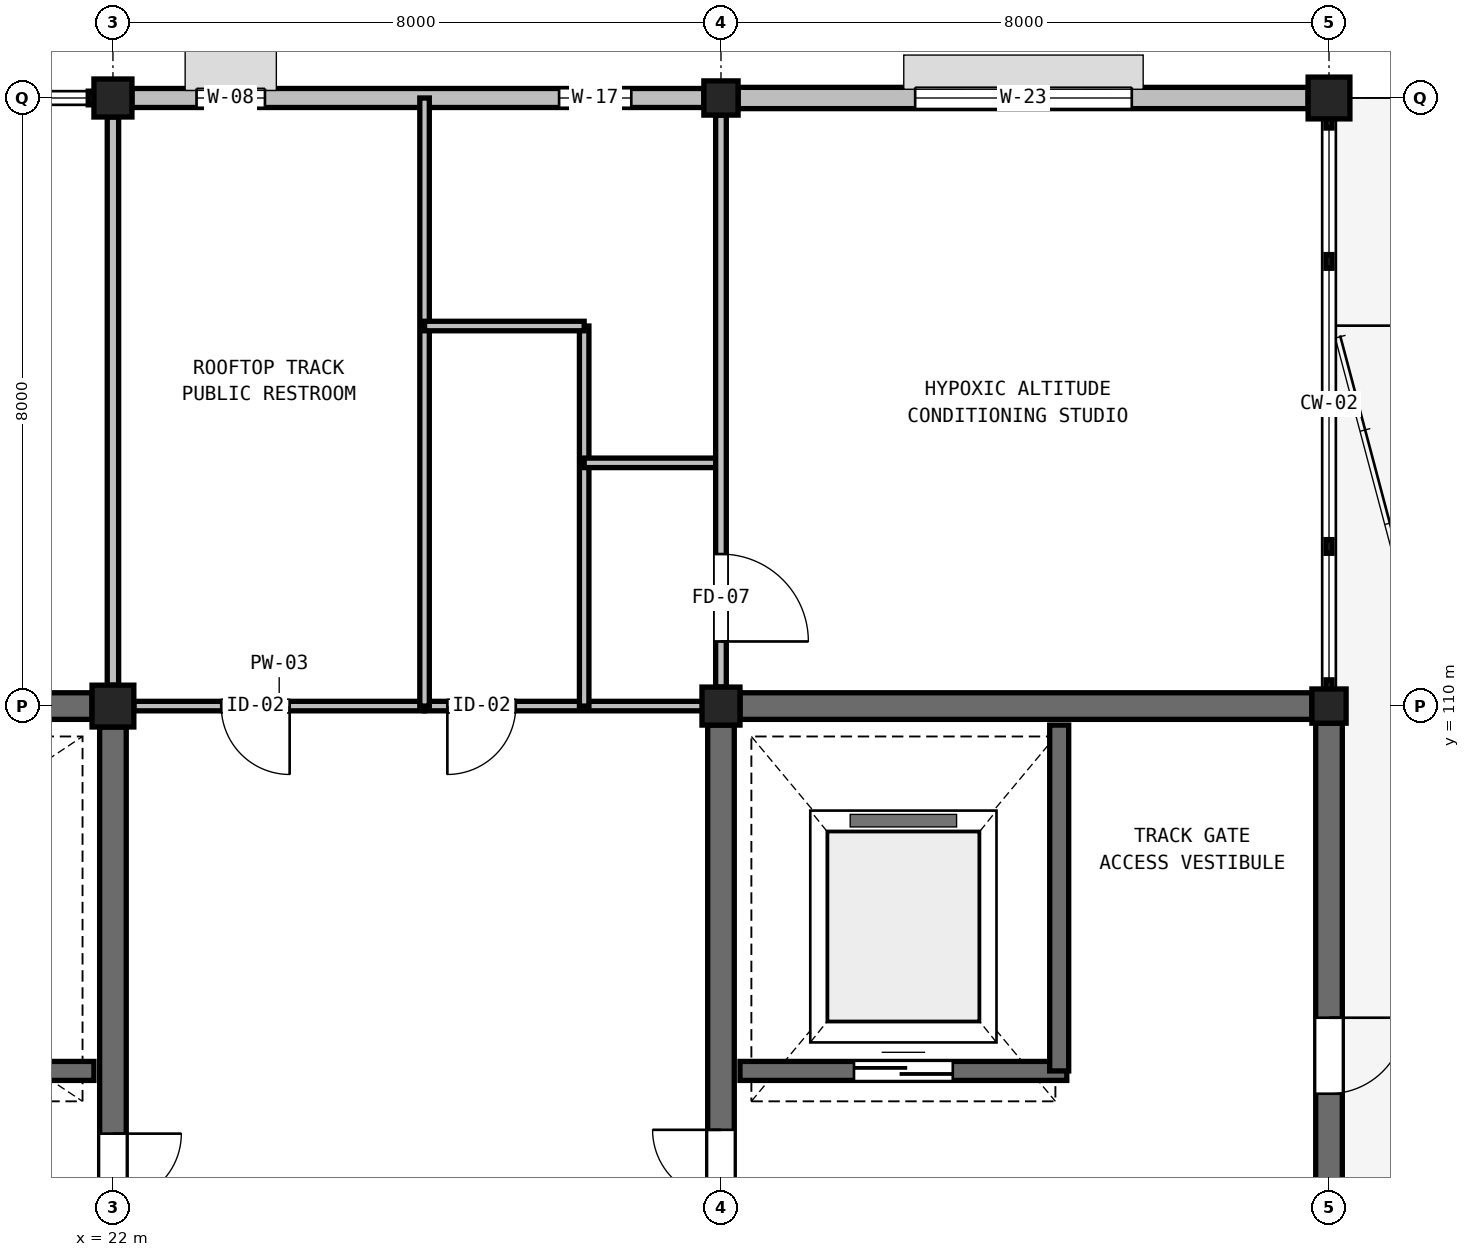
"""IFC4 building model, lengths in metres.
Left out: names, types, materials, properties, quantities, classifications, styles, units other than length and angle.
Written with IfcOpenShell. Run it as: python <this file> out.ifc"""

import sys

from ifc_helpers import new_model, si_unit, direction, frame, frame_2d, origin, origin_2d, place, context, subcontext, project, spatial, rectangle, extrude, element, fill, save


model = new_model("IFC4")
c1 = context("Model", 3, precision=1e-05, world=origin(), true_north=direction((0.0, 1.0)))
c2 = subcontext(c1, "Body", "Model", "MODEL_VIEW")
j1 = project(units=[si_unit("LENGTHUNIT", "METRE"), si_unit("PLANEANGLEUNIT", "RADIAN")], contexts=[c1])
p1 = place(None, origin())
s1 = spatial("IfcSite", under=j1, at=p1, CompositionType="ELEMENT")
p2 = place(p1, origin())
s2 = spatial("IfcBuilding", under=s1, at=p2, CompositionType="ELEMENT")
p3 = place(p2, frame((0.0, 0.0, 19.2)))
s3 = spatial("IfcBuildingStorey", under=s2, at=p3, CompositionType="ELEMENT", Elevation=19.2)
p4 = place(p3, frame((22.0, 110.0, 0.0), z_axis=(0.0, 0.0, 1.0), x_axis=(1.0, 0.0, 0.0)))
e1 = element("IfcColumn", 1, at=p4, inside=s3, PredefinedType="COLUMN", context=c2, shape_type="SweptSolid", body=[
    extrude(rectangle(XDim=0.55, YDim=0.55, at=origin_2d()), origin(), (0.0, 0.0, 1.0), 4.2),
])
for number, where, z_axis, x_axis in (
    (2, (22.0, 118.0, 0.0), (0.0, 0.0, 1.0), (1.0, 0.0, 0.0)),
    (3, (30.0, 110.0, 0.0), (0.0, 0.0, 1.0), (1.0, 0.0, 0.0)),
):
    element("IfcColumn", number, at=place(p3, frame(where, z_axis=z_axis, x_axis=x_axis)), inside=s3, PredefinedType="COLUMN", context=c2, shape_type="SweptSolid", body=[
        extrude(rectangle(XDim=0.5, YDim=0.5, at=origin_2d()), origin(), (0.0, 0.0, 1.0), 4.2),
    ])
for number, where, z_axis, x_axis in (
    (4, (30.0, 118.0, 0.0), (0.0, 0.0, 1.0), (1.0, 0.0, 0.0)),
    (5, (38.0, 110.0, 0.0), (0.0, 0.0, 1.0), (1.0, 0.0, 0.0)),
):
    element("IfcColumn", number, at=place(p3, frame(where, z_axis=z_axis, x_axis=x_axis)), inside=s3, PredefinedType="COLUMN", context=c2, shape_type="SweptSolid", body=[
        extrude(rectangle(XDim=0.45, YDim=0.45, at=origin_2d()), origin(), (0.0, 0.0, 1.0), 4.2),
    ])
p5 = place(p3, frame((38.0, 118.0, 0.0), z_axis=(0.0, 0.0, 1.0), x_axis=(1.0, 0.0, 0.0)))
e6 = element("IfcColumn", 6, at=p5, inside=s3, PredefinedType="COLUMN", context=c2, shape_type="SweptSolid", body=[
    extrude(rectangle(XDim=0.55, YDim=0.55, at=origin_2d()), origin(), (0.0, 0.0, 1.0), 4.2),
])
p6 = place(p3, frame((22.25, 118.0, 0.0), z_axis=(0.0, 0.0, 1.0), x_axis=(1.0, 0.0, 0.0)))
e7 = element("IfcWall", 7, at=p6, inside=s3, PredefinedType="SOLIDWALL", context=c2, shape_type="SweptSolid", body=[
    extrude(rectangle(XDim=7.525, YDim=0.25, at=frame_2d((3.762, 0.0))), origin(), (0.0, 0.0, 1.0), 3.17),
])
p7 = place(p6, frame((0.85, 0.0, 1.35)))
e8 = element("IfcOpeningElement", 8, at=p7, cuts=e7, PredefinedType="OPENING", context=c2, shape_type="SweptSolid", body=[
    extrude(rectangle(XDim=0.9, YDim=1.2, at=frame_2d((0.45, 0.6))), frame((0.0, 0.135, 0.0), z_axis=(0.0, -1.0, 0.0), x_axis=(1.0, 0.0, 0.0)), (0.0, 0.0, 1.0), 0.27),
])
p8 = place(p6, frame((5.62, 0.0, 0.9)))
e9 = element("IfcOpeningElement", 9, at=p8, cuts=e7, PredefinedType="OPENING", context=c2, shape_type="SweptSolid", body=[
    extrude(rectangle(XDim=0.95, YDim=1.65, at=frame_2d((0.475, 0.825))), frame((0.0, 0.135, 0.0), z_axis=(0.0, -1.0, 0.0), x_axis=(1.0, 0.0, 0.0)), (0.0, 0.0, 1.0), 0.27),
])
p9 = place(p3, frame((30.225, 118.0, 0.0), z_axis=(0.0, 0.0, 1.0), x_axis=(1.0, 0.0, 0.0)))
e10 = element("IfcWall", 10, at=p9, inside=s3, PredefinedType="SOLIDWALL", context=c2, shape_type="SweptSolid", body=[
    extrude(rectangle(XDim=7.5, YDim=0.28, at=frame_2d((3.75, 0.0))), origin(), (0.0, 0.0, 1.0), 3.25),
])
p10 = place(p9, frame((2.33, 0.0, 0.7)))
e11 = element("IfcOpeningElement", 11, at=p10, cuts=e10, PredefinedType="OPENING", context=c2, shape_type="SweptSolid", body=[
    extrude(rectangle(XDim=2.85, YDim=1.85, at=frame_2d((1.425, 0.925))), frame((0.0, 0.15, 0.0), z_axis=(0.0, -1.0, 0.0), x_axis=(1.0, 0.0, 0.0)), (0.0, 0.0, 1.0), 0.3),
])
p11 = place(p3, frame((14.225, 110.0, 0.0), z_axis=(0.0, 0.0, 1.0), x_axis=(1.0, 0.0, 0.0)))
e12 = element("IfcWall", 12, at=p11, inside=s3, PredefinedType="SHEAR", context=c2, shape_type="SweptSolid", body=[
    extrude(rectangle(XDim=7.5, YDim=0.35, at=frame_2d((3.75, 0.0))), origin(), (0.0, 0.0, 1.0), 3.98),
])
p12 = place(p3, frame((22.0, 102.225, 0.0), z_axis=(0.0, 0.0, 1.0), x_axis=(0.0, 1.0, 0.0)))
e13 = element("IfcWall", 13, at=p12, inside=s3, PredefinedType="SHEAR", context=c2, shape_type="SweptSolid", body=[
    extrude(rectangle(XDim=7.5, YDim=0.35, at=frame_2d((3.75, 0.0))), origin(), (0.0, 0.0, 1.0), 3.98),
])
p13 = place(p12, frame((0.35, 0.0, 0.0)))
e14 = element("IfcOpeningElement", 14, at=p13, cuts=e13, PredefinedType="OPENING", context=c2, shape_type="SweptSolid", body=[
    extrude(rectangle(XDim=1.8, YDim=2.2, at=frame_2d((0.9, 1.1))), frame((0.0, 0.185, 0.0), z_axis=(0.0, -1.0, 0.0), x_axis=(1.0, 0.0, 0.0)), (0.0, 0.0, 1.0), 0.37),
])
p14 = place(p3, frame((14.25, 105.2, 0.0), z_axis=(0.0, 0.0, 1.0), x_axis=(1.0, 0.0, 0.0)))
e15 = element("IfcWall", 15, at=p14, inside=s3, PredefinedType="SOLIDWALL", context=c2, shape_type="SweptSolid", body=[
    extrude(rectangle(XDim=7.5, YDim=0.25, at=frame_2d((3.75, 0.0))), origin(), (0.0, 0.0, 1.0), 3.98),
])
p15 = place(p14, frame((1.4, 0.0, 0.0)))
e16 = element("IfcOpeningElement", 16, at=p15, cuts=e15, PredefinedType="OPENING", context=c2, shape_type="SweptSolid", body=[
    extrude(rectangle(XDim=1.1, YDim=2.2, at=frame_2d((0.55, 1.1))), frame((0.0, 0.135, 0.0), z_axis=(0.0, -1.0, 0.0), x_axis=(1.0, 0.0, 0.0)), (0.0, 0.0, 1.0), 0.27),
])
p16 = place(p14, frame((5.0, 0.0, 0.0)))
e17 = element("IfcOpeningElement", 17, at=p16, cuts=e15, PredefinedType="OPENING", context=c2, shape_type="SweptSolid", body=[
    extrude(rectangle(XDim=1.1, YDim=2.2, at=frame_2d((0.55, 1.1))), frame((0.0, 0.135, 0.0), z_axis=(0.0, -1.0, 0.0), x_axis=(1.0, 0.0, 0.0)), (0.0, 0.0, 1.0), 0.27),
])
p17 = place(p3, frame((30.25, 110.0, 0.0), z_axis=(0.0, 0.0, 1.0), x_axis=(1.0, 0.0, 0.0)))
e18 = element("IfcWall", 18, at=p17, inside=s3, PredefinedType="SHEAR", context=c2, shape_type="SweptSolid", body=[
    extrude(rectangle(XDim=7.525, YDim=0.35, at=frame_2d((3.762, 0.0))), origin(), (0.0, 0.0, 1.0), 3.98),
])
p18 = place(p3, frame((30.0, 102.275, 0.0), z_axis=(0.0, 0.0, 1.0), x_axis=(0.0, 1.0, 0.0)))
e19 = element("IfcWall", 19, at=p18, inside=s3, PredefinedType="SHEAR", context=c2, shape_type="SweptSolid", body=[
    extrude(rectangle(XDim=7.475, YDim=0.35, at=frame_2d((3.738, 0.0))), origin(), (0.0, 0.0, 1.0), 3.98),
])
p19 = place(p18, frame((0.35, 0.0, 0.0)))
e20 = element("IfcOpeningElement", 20, at=p19, cuts=e19, PredefinedType="OPENING", context=c2, shape_type="SweptSolid", body=[
    extrude(rectangle(XDim=1.8, YDim=2.2, at=frame_2d((0.9, 1.1))), frame((0.0, 0.185, 0.0), z_axis=(0.0, -1.0, 0.0), x_axis=(1.0, 0.0, 0.0)), (0.0, 0.0, 1.0), 0.37),
])
p20 = place(p3, frame((38.0, 102.25, 0.0), z_axis=(0.0, 0.0, 1.0), x_axis=(0.0, 1.0, 0.0)))
e21 = element("IfcWall", 21, at=p20, inside=s3, PredefinedType="SHEAR", context=c2, shape_type="SweptSolid", body=[
    extrude(rectangle(XDim=7.525, YDim=0.35, at=frame_2d((3.762, 0.0))), origin(), (0.0, 0.0, 1.0), 3.98),
])
p21 = place(p20, frame((2.65, 0.0, 0.0)))
e22 = element("IfcOpeningElement", 22, at=p21, cuts=e21, PredefinedType="OPENING", context=c2, shape_type="SweptSolid", body=[
    extrude(rectangle(XDim=1.0, YDim=2.2, at=frame_2d((0.5, 1.1))), frame((0.0, 0.185, 0.0), z_axis=(0.0, -1.0, 0.0), x_axis=(1.0, 0.0, 0.0)), (0.0, 0.0, 1.0), 0.37),
])
p22 = place(p3, frame((30.25, 105.2, 0.0), z_axis=(0.0, 0.0, 1.0), x_axis=(1.0, 0.0, 0.0)))
e23 = element("IfcWall", 23, at=p22, inside=s3, PredefinedType="SOLIDWALL", context=c2, shape_type="SweptSolid", body=[
    extrude(rectangle(XDim=4.3, YDim=0.25, at=frame_2d((2.15, 0.0))), origin(), (0.0, 0.0, 1.0), 3.98),
])
p23 = place(p22, frame((1.5, 0.0, 0.0)))
e24 = element("IfcOpeningElement", 24, at=p23, cuts=e23, PredefinedType="OPENING", context=c2, shape_type="SweptSolid", body=[
    extrude(rectangle(XDim=1.3, YDim=2.2, at=frame_2d((0.65, 1.1))), frame((0.0, 0.135, 0.0), z_axis=(0.0, -1.0, 0.0), x_axis=(1.0, 0.0, 0.0)), (0.0, 0.0, 1.0), 0.27),
])
p24 = place(p3, frame((34.45, 105.2, 0.0), z_axis=(0.0, 0.0, 1.0), x_axis=(0.0, 1.0, 0.0)))
e25 = element("IfcWall", 25, at=p24, inside=s3, PredefinedType="SOLIDWALL", context=c2, shape_type="SweptSolid", body=[
    extrude(rectangle(XDim=4.55, YDim=0.25, at=frame_2d((2.275, 0.0))), origin(), (0.0, 0.0, 1.0), 3.98),
])
p25 = place(p3, frame((22.0, 110.275, 0.0), z_axis=(0.0, 0.0, 1.0), x_axis=(0.0, 1.0, 0.0)))
e26 = element("IfcWall", 26, at=p25, inside=s3, PredefinedType="PARTITIONING", context=c2, shape_type="SweptSolid", body=[
    extrude(rectangle(XDim=7.475, YDim=0.15, at=frame_2d((3.738, 0.0))), origin(), (0.0, 0.0, 1.0), 2.97),
])
p26 = place(p3, frame((22.275, 110.0, 0.0), z_axis=(0.0, 0.0, 1.0), x_axis=(1.0, 0.0, 0.0)))
e27 = element("IfcWall", 27, at=p26, inside=s3, PredefinedType="PARTITIONING", context=c2, shape_type="SweptSolid", body=[
    extrude(rectangle(XDim=3.825, YDim=0.125, at=frame_2d((1.913, 0.0))), origin(), (0.0, 0.0, 1.0), 3.27),
])
p27 = place(p26, frame((1.15, 0.0, 0.0)))
e28 = element("IfcOpeningElement", 28, at=p27, cuts=e27, PredefinedType="OPENING", context=c2, shape_type="SweptSolid", body=[
    extrude(rectangle(XDim=0.9, YDim=2.1, at=frame_2d((0.45, 1.05))), frame((0.0, 0.073, 0.0), z_axis=(0.0, -1.0, 0.0), x_axis=(1.0, 0.0, 0.0)), (0.0, 0.0, 1.0), 0.145),
])
p28 = place(p3, frame((26.1, 110.0, 0.0), z_axis=(0.0, 0.0, 1.0), x_axis=(1.0, 0.0, 0.0)))
e29 = element("IfcWall", 29, at=p28, inside=s3, PredefinedType="PARTITIONING", context=c2, shape_type="SweptSolid", body=[
    extrude(rectangle(XDim=3.8, YDim=0.125, at=frame_2d((1.9, 0.0))), origin(), (0.0, 0.0, 1.0), 3.27),
])
p29 = place(p28, frame((0.3, 0.0, 0.0)))
e30 = element("IfcOpeningElement", 30, at=p29, cuts=e29, PredefinedType="OPENING", context=c2, shape_type="SweptSolid", body=[
    extrude(rectangle(XDim=0.9, YDim=2.1, at=frame_2d((0.45, 1.05))), frame((0.0, 0.073, 0.0), z_axis=(0.0, -1.0, 0.0), x_axis=(1.0, 0.0, 0.0)), (0.0, 0.0, 1.0), 0.145),
])
p30 = place(p3, frame((26.1, 110.0, 0.0), z_axis=(0.0, 0.0, 1.0), x_axis=(0.0, 1.0, 0.0)))
e31 = element("IfcWall", 31, at=p30, inside=s3, PredefinedType="PARTITIONING", context=c2, shape_type="SweptSolid", body=[
    extrude(rectangle(XDim=8.0, YDim=0.125, at=frame_2d((4.0, 0.0))), origin(), (0.0, 0.0, 1.0), 3.9),
])
p31 = place(p3, frame((28.2, 110.0, 0.0), z_axis=(0.0, 0.0, 1.0), x_axis=(0.0, 1.0, 0.0)))
e32 = element("IfcWall", 32, at=p31, inside=s3, PredefinedType="PARTITIONING", context=c2, shape_type="SweptSolid", body=[
    extrude(rectangle(XDim=5.0, YDim=0.125, at=frame_2d((2.5, 0.0))), origin(), (0.0, 0.0, 1.0), 3.9),
])
p32 = place(p3, frame((28.2, 113.2, 0.0), z_axis=(0.0, 0.0, 1.0), x_axis=(1.0, 0.0, 0.0)))
e33 = element("IfcWall", 33, at=p32, inside=s3, PredefinedType="PARTITIONING", context=c2, shape_type="SweptSolid", body=[
    extrude(rectangle(XDim=1.8, YDim=0.125, at=frame_2d((0.9, 0.0))), origin(), (0.0, 0.0, 1.0), 3.9),
])
p33 = place(p3, frame((30.0, 110.25, 0.0), z_axis=(0.0, 0.0, 1.0), x_axis=(0.0, 1.0, 0.0)))
e34 = element("IfcWall", 34, at=p33, inside=s3, PredefinedType="PARTITIONING", context=c2, shape_type="SweptSolid", body=[
    extrude(rectangle(XDim=7.525, YDim=0.14, at=frame_2d((3.762, 0.0))), origin(), (0.0, 0.0, 1.0), 3.27),
])
p34 = place(p33, frame((0.6, 0.0, 0.0)))
e35 = element("IfcOpeningElement", 35, at=p34, cuts=e34, PredefinedType="OPENING", context=c2, shape_type="SweptSolid", body=[
    extrude(rectangle(XDim=1.15, YDim=2.2, at=frame_2d((0.575, 1.1))), frame((0.0, 0.08, 0.0), z_axis=(0.0, -1.0, 0.0), x_axis=(1.0, 0.0, 0.0)), (0.0, 0.0, 1.0), 0.16),
])
p35 = place(p3, frame((26.1, 115.0, 0.0), z_axis=(0.0, 0.0, 1.0), x_axis=(1.0, 0.0, 0.0)))
e36 = element("IfcWall", 36, at=p35, inside=s3, PredefinedType="PARTITIONING", context=c2, shape_type="SweptSolid", body=[
    extrude(rectangle(XDim=2.1, YDim=0.125, at=frame_2d((1.05, 0.0))), origin(), (0.0, 0.0, 1.0), 3.9),
])
p36 = place(p7, origin())
e37 = element("IfcWindow", 37, at=p36, inside=s3, PartitioningType="SINGLE_PANEL", PredefinedType="WINDOW", context=c2, shape_type="SweptSolid", body=[
    extrude(rectangle(XDim=0.9, YDim=1.2, at=frame_2d((0.45, 0.6))), frame((0.0, 0.03, 0.0), z_axis=(0.0, -1.0, 0.0), x_axis=(1.0, 0.0, 0.0)), (0.0, 0.0, 1.0), 0.06),
])
fill(e8, e37)
p37 = place(p8, origin())
e38 = element("IfcWindow", 38, at=p37, inside=s3, PartitioningType="SINGLE_PANEL", PredefinedType="WINDOW", context=c2, shape_type="SweptSolid", body=[
    extrude(rectangle(XDim=0.95, YDim=1.65, at=frame_2d((0.475, 0.825))), frame((0.0, 0.03, 0.0), z_axis=(0.0, -1.0, 0.0), x_axis=(1.0, 0.0, 0.0)), (0.0, 0.0, 1.0), 0.06),
])
fill(e9, e38)
p38 = place(p10, origin())
e39 = element("IfcWindow", 39, at=p38, inside=s3, PartitioningType="SINGLE_PANEL", PredefinedType="WINDOW", context=c2, shape_type="SweptSolid", body=[
    extrude(rectangle(XDim=2.85, YDim=1.85, at=frame_2d((1.425, 0.925))), frame((0.0, 0.03, 0.0), z_axis=(0.0, -1.0, 0.0), x_axis=(1.0, 0.0, 0.0)), (0.0, 0.0, 1.0), 0.06),
])
fill(e11, e39)
p39 = place(p13, frame((1.8, 0.0, 0.0), z_axis=(0.0, 0.0, 1.0), x_axis=(-1.0, 0.0, 0.0)))
e40 = element("IfcDoor", 40, at=p39, inside=s3, OperationType="DOUBLE_DOOR_SINGLE_SWING", PredefinedType="DOOR", context=c2, shape_type="SweptSolid", body=[
    extrude(rectangle(XDim=1.8, YDim=2.2, at=frame_2d((0.9, 1.1))), frame((0.0, 0.025, 0.0), z_axis=(0.0, -1.0, 0.0), x_axis=(1.0, 0.0, 0.0)), (0.0, 0.0, 1.0), 0.05),
])
fill(e14, e40)
p40 = place(p19, origin())
e41 = element("IfcDoor", 41, at=p40, inside=s3, OperationType="DOUBLE_DOOR_SINGLE_SWING", PredefinedType="DOOR", context=c2, shape_type="SweptSolid", body=[
    extrude(rectangle(XDim=1.8, YDim=2.2, at=frame_2d((0.9, 1.1))), frame((0.0, 0.025, 0.0), z_axis=(0.0, -1.0, 0.0), x_axis=(1.0, 0.0, 0.0)), (0.0, 0.0, 1.0), 0.05),
])
fill(e20, e41)
p41 = place(p21, frame((1.0, 0.0, 0.0), z_axis=(0.0, 0.0, 1.0), x_axis=(-1.0, 0.0, 0.0)))
e42 = element("IfcDoor", 42, at=p41, inside=s3, OperationType="SINGLE_SWING_RIGHT", PredefinedType="DOOR", context=c2, shape_type="SweptSolid", body=[
    extrude(rectangle(XDim=1.0, YDim=2.2, at=frame_2d((0.5, 1.1))), frame((0.0, 0.025, 0.0), z_axis=(0.0, -1.0, 0.0), x_axis=(1.0, 0.0, 0.0)), (0.0, 0.0, 1.0), 0.05),
])
fill(e22, e42)
p42 = place(p23, origin())
e43 = element("IfcDoor", 43, at=p42, inside=s3, OperationType="DOUBLE_DOOR_SLIDING", PredefinedType="DOOR", context=c2, shape_type="SweptSolid", body=[
    extrude(rectangle(XDim=1.3, YDim=2.2, at=frame_2d((0.65, 1.1))), frame((0.0, 0.025, 0.0), z_axis=(0.0, -1.0, 0.0), x_axis=(1.0, 0.0, 0.0)), (0.0, 0.0, 1.0), 0.05),
])
fill(e24, e43)
p43 = place(p27, frame((0.9, 0.0, 0.0), z_axis=(0.0, 0.0, 1.0), x_axis=(-1.0, 0.0, 0.0)))
e44 = element("IfcDoor", 44, at=p43, inside=s3, OperationType="SINGLE_SWING_RIGHT", PredefinedType="DOOR", context=c2, shape_type="SweptSolid", body=[
    extrude(rectangle(XDim=0.9, YDim=2.1, at=frame_2d((0.45, 1.05))), frame((0.0, 0.025, 0.0), z_axis=(0.0, -1.0, 0.0), x_axis=(1.0, 0.0, 0.0)), (0.0, 0.0, 1.0), 0.05),
])
fill(e28, e44)
p44 = place(p29, frame((0.9, 0.0, 0.0), z_axis=(0.0, 0.0, 1.0), x_axis=(-1.0, 0.0, 0.0)))
e45 = element("IfcDoor", 45, at=p44, inside=s3, OperationType="SINGLE_SWING_LEFT", PredefinedType="DOOR", context=c2, shape_type="SweptSolid", body=[
    extrude(rectangle(XDim=0.9, YDim=2.1, at=frame_2d((0.45, 1.05))), frame((0.0, 0.025, 0.0), z_axis=(0.0, -1.0, 0.0), x_axis=(1.0, 0.0, 0.0)), (0.0, 0.0, 1.0), 0.05),
])
fill(e30, e45)
p45 = place(p34, frame((1.15, 0.0, 0.0), z_axis=(0.0, 0.0, 1.0), x_axis=(-1.0, 0.0, 0.0)))
e46 = element("IfcDoor", 46, at=p45, inside=s3, OperationType="SINGLE_SWING_LEFT", PredefinedType="DOOR", context=c2, shape_type="SweptSolid", body=[
    extrude(rectangle(XDim=1.15, YDim=2.2, at=frame_2d((0.575, 1.1))), frame((0.0, 0.025, 0.0), z_axis=(0.0, -1.0, 0.0), x_axis=(1.0, 0.0, 0.0)), (0.0, 0.0, 1.0), 0.05),
])
fill(e35, e46)
save(model, sys.argv[1])
